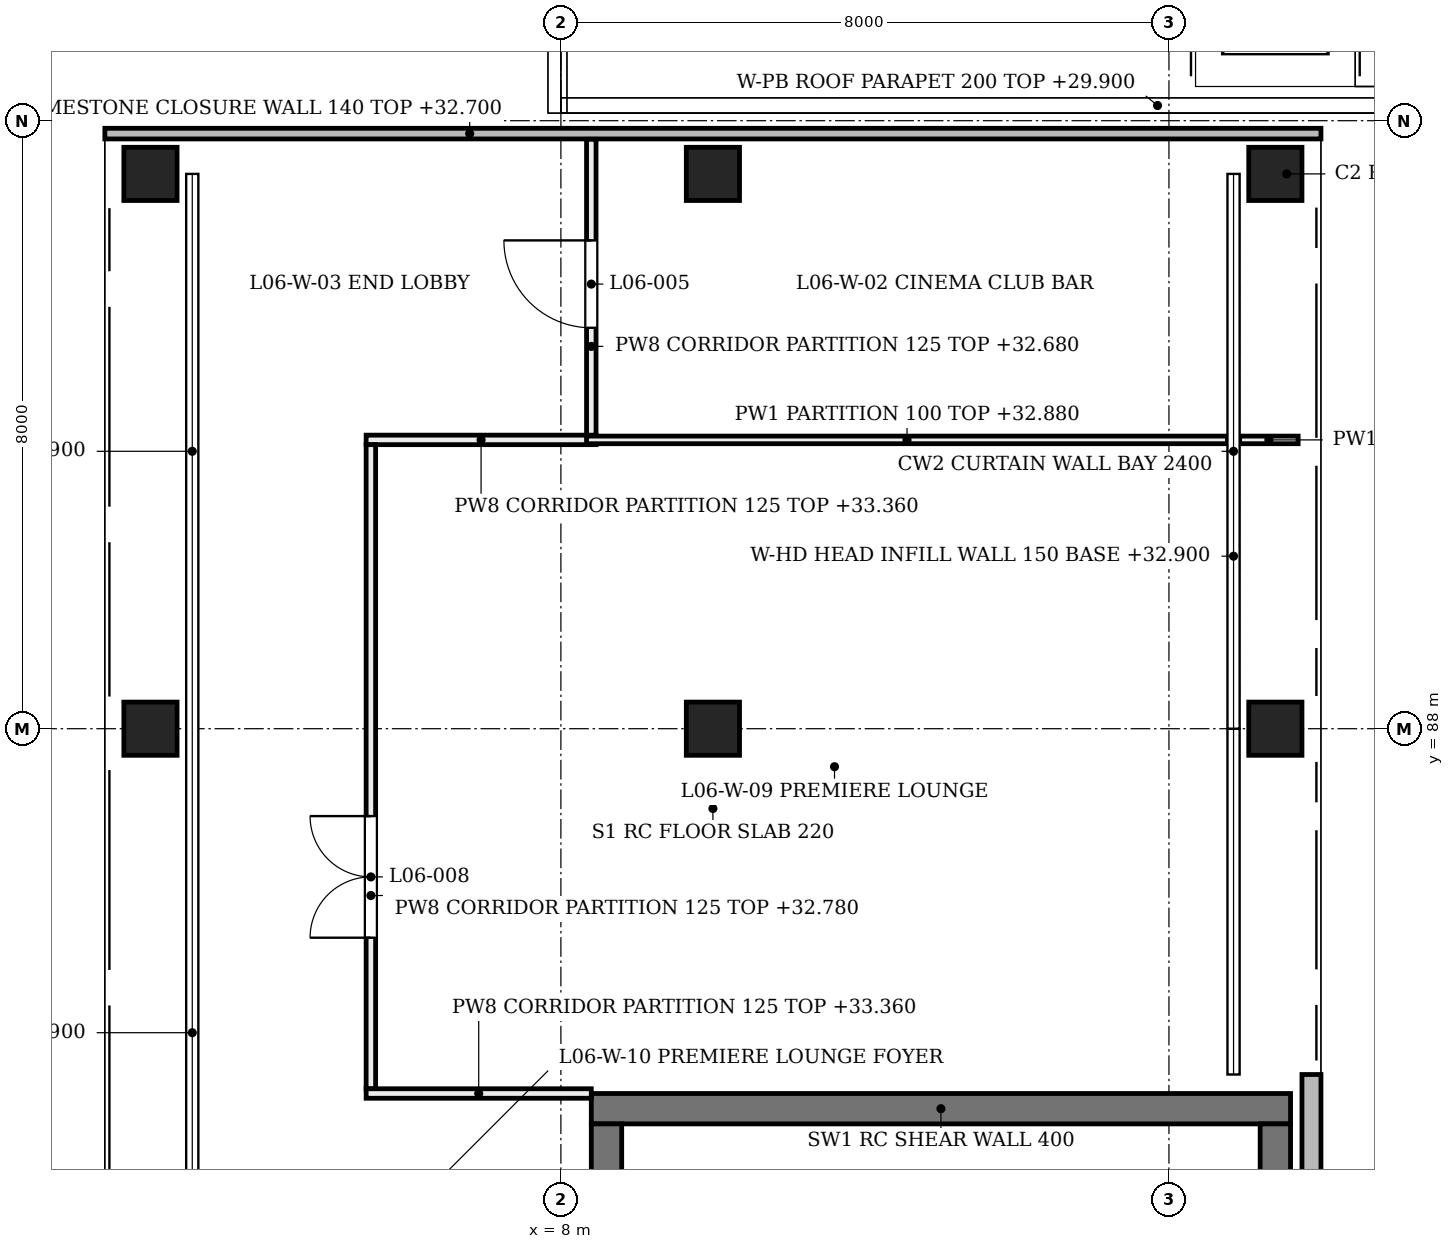
"""IFC4 building model, lengths in metres.
Left out: names, types, materials, properties, quantities, classifications, styles, units other than length and angle.
Written with IfcOpenShell. Run it as: python <this file> out.ifc"""

import sys

from ifc_helpers import new_model, si_unit, direction, frame, frame_2d, origin, origin_2d, place, context, subcontext, project, spatial, rectangle, extrude, element, fill, save


model = new_model("IFC4")
c1 = context("Model", 3, precision=1e-05, world=origin(), true_north=direction((0.0, 1.0)))
c2 = subcontext(c1, "Body", "Model", "MODEL_VIEW")
j1 = project(units=[si_unit("LENGTHUNIT", "METRE"), si_unit("PLANEANGLEUNIT", "RADIAN")], contexts=[c1])
p1 = place(None, origin())
s1 = spatial("IfcSite", under=j1, at=p1, CompositionType="ELEMENT")
p2 = place(p1, origin())
s2 = spatial("IfcBuilding", under=s1, at=p2, CompositionType="ELEMENT")
p3 = place(p2, frame((0.0, 0.0, 28.8)))
s3 = spatial("IfcBuildingStorey", under=s2, at=p3, CompositionType="ELEMENT", Elevation=28.8)
p4 = place(p3, frame((8.4, 83.0, 0.0), z_axis=(0.0, 0.0, 1.0), x_axis=(1.0, 0.0, 0.0)))
e1 = element("IfcWall", 1, at=p4, inside=s3, PredefinedType="SHEAR", context=c2, shape_type="SweptSolid", body=[
    extrude(rectangle(XDim=9.2, YDim=0.4, at=frame_2d((4.6, 0.0))), origin(), (0.0, 0.0, 1.0), 4.58),
])
p5 = place(p3, frame((8.6, 75.8, 0.0), z_axis=(0.0, 0.0, 1.0), x_axis=(0.0, 1.0, 0.0)))
e2 = element("IfcWall", 2, at=p5, inside=s3, PredefinedType="SHEAR", context=c2, shape_type="SweptSolid", body=[
    extrude(rectangle(XDim=7.0, YDim=0.4, at=frame_2d((3.5, 0.0))), origin(), (0.0, 0.0, 1.0), 4.58),
])
p6 = place(p5, frame((2.974, 0.0, 0.0)))
e3 = element("IfcOpeningElement", 3, at=p6, cuts=e2, PredefinedType="OPENING", context=c2, shape_type="SweptSolid", body=[
    extrude(rectangle(XDim=1.25, YDim=2.1, at=frame_2d((0.625, 1.05))), frame((0.0, 0.21, 0.0), z_axis=(0.0, -1.0, 0.0), x_axis=(1.0, 0.0, 0.0)), (0.0, 0.0, 1.0), 0.42),
])
p7 = place(p3, frame((17.4, 75.8, 0.0), z_axis=(0.0, 0.0, 1.0), x_axis=(0.0, 1.0, 0.0)))
e4 = element("IfcWall", 4, at=p7, inside=s3, PredefinedType="SHEAR", context=c2, shape_type="SweptSolid", body=[
    extrude(rectangle(XDim=7.0, YDim=0.4, at=frame_2d((3.5, 0.0))), origin(), (0.0, 0.0, 1.0), 4.58),
])
for number, where, z_axis, x_axis in (
    (5, (2.6, 88.0, 0.0), (0.0, 0.0, 1.0), (1.0, 0.0, 0.0)),
    (6, (2.6, 95.3, 0.0), (0.0, 0.0, 1.0), (1.0, 0.0, 0.0)),
    (7, (10.0, 88.0, 0.0), (0.0, 0.0, 1.0), (1.0, 0.0, 0.0)),
    (8, (10.0, 95.3, 0.0), (0.0, 0.0, 1.0), (1.0, 0.0, 0.0)),
    (9, (17.4, 88.0, 0.0), (0.0, 0.0, 1.0), (1.0, 0.0, 0.0)),
    (10, (17.4, 95.3, 0.0), (0.0, 0.0, 1.0), (1.0, 0.0, 0.0)),
):
    element("IfcColumn", number, at=place(p3, frame(where, z_axis=z_axis, x_axis=x_axis)), inside=s3, PredefinedType="COLUMN", context=c2, shape_type="SweptSolid", body=[
        extrude(rectangle(XDim=0.7, YDim=0.7, at=origin_2d()), origin(), (0.0, 0.0, 1.0), 4.58),
    ])
p8 = place(p3, frame((3.15, 80.2, 4.1), z_axis=(0.0, 0.0, 1.0), x_axis=(0.0, 1.0, 0.0)))
e11 = element("IfcWall", 11, at=p8, inside=s3, PredefinedType="SOLIDWALL", context=c2, shape_type="SweptSolid", body=[
    extrude(rectangle(XDim=7.6, YDim=0.15, at=frame_2d((3.8, 0.0))), origin(), (0.0, 0.0, 1.0), 0.48),
])
p9 = place(p3, frame((3.15, 88.2, 4.1), z_axis=(0.0, 0.0, 1.0), x_axis=(0.0, 1.0, 0.0)))
e12 = element("IfcWall", 12, at=p9, inside=s3, PredefinedType="SOLIDWALL", context=c2, shape_type="SweptSolid", body=[
    extrude(rectangle(XDim=6.9, YDim=0.15, at=frame_2d((3.45, 0.0))), origin(), (0.0, 0.0, 1.0), 0.48),
])
p10 = place(p3, frame((17.875, 75.15, 0.0), z_axis=(0.0, 0.0, 1.0), x_axis=(0.0, 1.0, 0.0)))
e13 = element("IfcWall", 13, at=p10, inside=s3, PredefinedType="SOLIDWALL", context=c2, shape_type="SweptSolid", body=[
    extrude(rectangle(XDim=8.3, YDim=0.25, at=frame_2d((4.15, 0.0))), origin(), (0.0, 0.0, 1.0), 3.9),
])
p11 = place(p3, frame((16.85, 88.2, 4.1), z_axis=(0.0, 0.0, 1.0), x_axis=(0.0, 1.0, 0.0)))
e14 = element("IfcWall", 14, at=p11, inside=s3, PredefinedType="SOLIDWALL", context=c2, shape_type="SweptSolid", body=[
    extrude(rectangle(XDim=6.9, YDim=0.15, at=frame_2d((3.45, 0.0))), origin(), (0.0, 0.0, 1.0), 0.48),
])
p12 = place(p3, frame((7.955, 96.1, 0.0), z_axis=(0.0, 0.0, 1.0), x_axis=(0.0, 1.0, 0.0)))
e15 = element("IfcWall", 15, at=p12, inside=s3, PredefinedType="PARAPET", context=c2, shape_type="SweptSolid", body=[
    extrude(rectangle(XDim=16.2, YDim=0.25, at=frame_2d((8.1, 0.0))), origin(), (0.0, 0.0, 1.0), 1.1),
])
p13 = place(p3, frame((2.0, 95.83, 0.0), z_axis=(0.0, 0.0, 1.0), x_axis=(1.0, 0.0, 0.0)))
e16 = element("IfcWall", 16, at=p13, inside=s3, PredefinedType="SOLIDWALL", context=c2, shape_type="SweptSolid", body=[
    extrude(rectangle(XDim=16.0, YDim=0.14, at=frame_2d((8.0, 0.0))), origin(), (0.0, 0.0, 1.0), 3.9),
])
p14 = place(p3, frame((8.0, 96.2, 0.0), z_axis=(0.0, 0.0, 1.0), x_axis=(1.0, 0.0, 0.0)))
e17 = element("IfcWall", 17, at=p14, inside=s3, PredefinedType="PARAPET", context=c2, shape_type="SweptSolid", body=[
    extrude(rectangle(XDim=15.7, YDim=0.2, at=frame_2d((7.85, 0.0))), origin(), (0.0, 0.0, 1.0), 1.1),
])
p15 = place(p3, frame((5.438, 91.8, 0.0), z_axis=(0.0, 0.0, 1.0), x_axis=(1.0, 0.0, 0.0)))
e18 = element("IfcWall", 18, at=p15, inside=s3, PredefinedType="PARTITIONING", context=c2, shape_type="SweptSolid", body=[
    extrude(rectangle(XDim=3.025, YDim=0.125, at=frame_2d((1.512, 0.0))), origin(), (0.0, 0.0, 1.0), 4.56),
])
p16 = place(p3, frame((8.337, 91.8, 0.0), z_axis=(0.0, 0.0, 1.0), x_axis=(1.0, 0.0, 0.0)))
e19 = element("IfcWall", 19, at=p16, inside=s3, PredefinedType="PARTITIONING", context=c2, shape_type="SweptSolid", body=[
    extrude(rectangle(XDim=8.433, YDim=0.1, at=frame_2d((4.216, 0.0))), origin(), (0.0, 0.0, 1.0), 4.08),
])
p17 = place(p3, frame((16.93, 91.8, 0.0), z_axis=(0.0, 0.0, 1.0), x_axis=(1.0, 0.0, 0.0)))
e20 = element("IfcWall", 20, at=p17, inside=s3, PredefinedType="PARTITIONING", context=c2, shape_type="SweptSolid", body=[
    extrude(rectangle(XDim=0.77, YDim=0.1, at=frame_2d((0.385, 0.0))), origin(), (0.0, 0.0, 1.0), 4.08),
])
p18 = place(p3, frame((8.4, 91.863, 0.0), z_axis=(0.0, 0.0, 1.0), x_axis=(0.0, 1.0, 0.0)))
e21 = element("IfcWall", 21, at=p18, inside=s3, PredefinedType="PARTITIONING", context=c2, shape_type="SweptSolid", body=[
    extrude(rectangle(XDim=3.892, YDim=0.125, at=frame_2d((1.946, 0.0))), origin(), (0.0, 0.0, 1.0), 3.88),
])
p19 = place(p18, frame((1.413, 0.0, 0.0)))
e22 = element("IfcOpeningElement", 22, at=p19, cuts=e21, PredefinedType="OPENING", context=c2, shape_type="SweptSolid", body=[
    extrude(rectangle(XDim=1.15, YDim=2.1, at=frame_2d((0.575, 1.05))), frame((0.0, 0.073, 0.0), z_axis=(0.0, -1.0, 0.0), x_axis=(1.0, 0.0, 0.0)), (0.0, 0.0, 1.0), 0.145),
])
p20 = place(p3, frame((5.5, 83.262, 0.0), z_axis=(0.0, 0.0, 1.0), x_axis=(0.0, 1.0, 0.0)))
e23 = element("IfcWall", 23, at=p20, inside=s3, PredefinedType="PARTITIONING", context=c2, shape_type="SweptSolid", body=[
    extrude(rectangle(XDim=8.475, YDim=0.125, at=frame_2d((4.238, 0.0))), origin(), (0.0, 0.0, 1.0), 3.98),
])
p21 = place(p20, frame((1.988, 0.0, 0.0)))
e24 = element("IfcOpeningElement", 24, at=p21, cuts=e23, PredefinedType="OPENING", context=c2, shape_type="SweptSolid", body=[
    extrude(rectangle(XDim=1.6, YDim=2.2, at=frame_2d((0.8, 1.1))), frame((0.0, 0.073, 0.0), z_axis=(0.0, -1.0, 0.0), x_axis=(1.0, 0.0, 0.0)), (0.0, 0.0, 1.0), 0.145),
])
p22 = place(p3, frame((5.438, 83.2, 0.0), z_axis=(0.0, 0.0, 1.0), x_axis=(1.0, 0.0, 0.0)))
e25 = element("IfcWall", 25, at=p22, inside=s3, PredefinedType="PARTITIONING", context=c2, shape_type="SweptSolid", body=[
    extrude(rectangle(XDim=2.962, YDim=0.125, at=frame_2d((1.481, 0.0))), origin(), (0.0, 0.0, 1.0), 4.56),
])
p23 = place(p19, frame((1.15, 0.0, 0.0), z_axis=(0.0, 0.0, 1.0), x_axis=(-1.0, 0.0, 0.0)))
e26 = element("IfcDoor", 26, at=p23, inside=s3, OperationType="SINGLE_SWING_RIGHT", PredefinedType="DOOR", context=c2, shape_type="SweptSolid", body=[
    extrude(rectangle(XDim=1.15, YDim=2.1, at=frame_2d((0.575, 1.05))), frame((0.0, 0.025, 0.0), z_axis=(0.0, -1.0, 0.0), x_axis=(1.0, 0.0, 0.0)), (0.0, 0.0, 1.0), 0.05),
])
fill(e22, e26)
p24 = place(p21, origin())
e27 = element("IfcDoor", 27, at=p24, inside=s3, OperationType="DOUBLE_DOOR_SINGLE_SWING", PredefinedType="DOOR", context=c2, shape_type="SweptSolid", body=[
    extrude(rectangle(XDim=1.6, YDim=2.2, at=frame_2d((0.8, 1.1))), frame((0.0, 0.025, 0.0), z_axis=(0.0, -1.0, 0.0), x_axis=(1.0, 0.0, 0.0)), (0.0, 0.0, 1.0), 0.05),
])
fill(e24, e27)
save(model, sys.argv[1])
